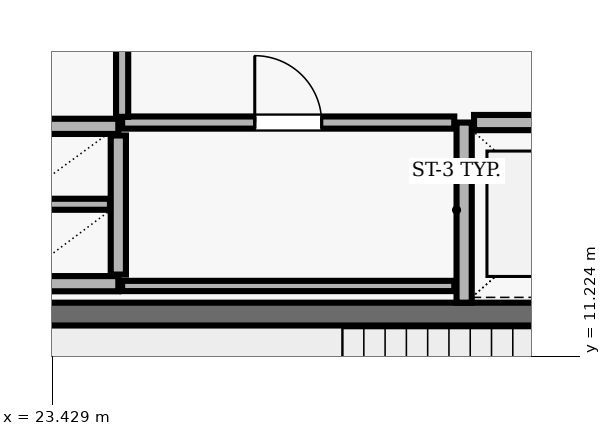
"""IFC4 building model, lengths in metres.
Left out: names, types, materials, properties, quantities, classifications, styles, units other than length and angle.
Written with IfcOpenShell. Run it as: python <this file> out.ifc"""

import sys

from ifc_helpers import new_model, si_unit, direction, frame, frame_2d, origin, place, context, subcontext, project, spatial, rectangle, extrude, element, fill, save


model = new_model("IFC4")
c1 = context("Model", 3, precision=1e-05, world=origin(), true_north=direction((0.0, 1.0)))
c2 = subcontext(c1, "Body", "Model", "MODEL_VIEW")
j1 = project(units=[si_unit("LENGTHUNIT", "METRE"), si_unit("PLANEANGLEUNIT", "RADIAN")], contexts=[c1])
p1 = place(None, origin())
s1 = spatial("IfcSite", under=j1, at=p1, CompositionType="ELEMENT")
p2 = place(p1, origin())
s2 = spatial("IfcBuilding", under=s1, at=p2, CompositionType="ELEMENT")
p3 = place(p2, frame((0.0, 0.0, 222.6)))
s3 = spatial("IfcBuildingStorey", under=s2, at=p3, CompositionType="ELEMENT", Elevation=222.6)
p4 = place(p3, frame((31.58, 11.78, 0.0), z_axis=(0.0, 0.0, 1.0), x_axis=(-1.0, 0.0, 0.0)))
e1 = element("IfcWall", 1, at=p4, inside=s3, PredefinedType="SHEAR", context=c2, shape_type="SweptSolid", body=[
    extrude(rectangle(XDim=8.36, YDim=0.3, at=frame_2d((4.18, 0.0))), origin(), (0.0, 0.0, 1.0), 3.69),
])
p5 = place(p3, frame((28.85, 14.3, 0.0), z_axis=(0.0, 0.0, 1.0), x_axis=(0.0, -1.0, 0.0)))
e2 = element("IfcWall", 2, at=p5, inside=s3, PredefinedType="SOLIDWALL", context=c2, shape_type="SweptSolid", body=[
    extrude(rectangle(XDim=2.37, YDim=0.2, at=frame_2d((1.185, 0.0))), origin(), (0.0, 0.0, 1.0), 3.69),
])
p6 = place(p3, frame((31.42, 14.3, 0.0), z_axis=(0.0, 0.0, 1.0), x_axis=(-1.0, 0.0, 0.0)))
e3 = element("IfcWall", 3, at=p6, inside=s3, PredefinedType="SOLIDWALL", context=c2, shape_type="SweptSolid", body=[
    extrude(rectangle(XDim=2.44, YDim=0.2, at=frame_2d((1.22, 0.0))), origin(), (0.0, 0.0, 1.0), 3.69),
])
for number, where, z_axis, x_axis in (
    (4, (22.9, 14.25, 0.0), (0.0, 0.0, 1.0), (1.0, 0.0, 0.0)),
    (5, (22.9, 12.18, 0.0), (0.0, 0.0, 1.0), (1.0, 0.0, 0.0)),
):
    element("IfcWall", number, at=place(p3, frame(where, z_axis=z_axis, x_axis=x_axis)), inside=s3, PredefinedType="SOLIDWALL", context=c2, shape_type="SweptSolid", body=[
        extrude(rectangle(XDim=1.4, YDim=0.2, at=frame_2d((0.7, 0.0))), origin(), (0.0, 0.0, 1.0), 3.69),
    ])
p7 = place(p3, frame((24.3, 12.3, 0.0), z_axis=(0.0, 0.0, 1.0), x_axis=(0.0, 1.0, 0.0)))
e6 = element("IfcWall", 6, at=p7, inside=s3, PredefinedType="SOLIDWALL", context=c2, shape_type="SweptSolid", body=[
    extrude(rectangle(XDim=1.83, YDim=0.2, at=frame_2d((0.915, 0.0))), origin(), (0.0, 0.0, 1.0), 3.69),
])
p8 = place(p3, frame((23.01, 13.225, 0.0), z_axis=(0.0, 0.0, 1.0), x_axis=(1.0, 0.0, 0.0)))
e7 = element("IfcWall", 7, at=p8, inside=s3, PredefinedType="PARTITIONING", context=c2, shape_type="SweptSolid", body=[
    extrude(rectangle(XDim=1.18, YDim=0.145, at=frame_2d((0.59, 0.0))), origin(), (0.0, 0.0, 1.0), 3.69),
])
p9 = place(p3, frame((24.35, 12.15, 0.0), z_axis=(0.0, 0.0, 1.0), x_axis=(1.0, 0.0, 0.0)))
e8 = element("IfcWall", 8, at=p9, inside=s3, PredefinedType="PARTITIONING", context=c2, shape_type="SweptSolid", body=[
    extrude(rectangle(XDim=4.37, YDim=0.135, at=frame_2d((2.185, 0.0))), origin(), (0.0, 0.0, 1.0), 3.69),
])
p10 = place(p3, frame((24.35, 14.3, 0.0), z_axis=(0.0, 0.0, 1.0), x_axis=(1.0, 0.0, 0.0)))
e9 = element("IfcWall", 9, at=p10, inside=s3, PredefinedType="PARTITIONING", context=c2, shape_type="SweptSolid", body=[
    extrude(rectangle(XDim=4.37, YDim=0.16, at=frame_2d((2.185, 0.0))), origin(), (0.0, 0.0, 1.0), 3.69),
])
p11 = place(p10, frame((1.745, 0.0, 0.0)))
e10 = element("IfcOpeningElement", 10, at=p11, cuts=e9, PredefinedType="OPENING", context=c2, shape_type="SweptSolid", body=[
    extrude(rectangle(XDim=0.88, YDim=2.1, at=frame_2d((0.44, 1.05))), frame((0.0, 0.09, 0.0), z_axis=(0.0, -1.0, 0.0), x_axis=(1.0, 0.0, 0.0)), (0.0, 0.0, 1.0), 0.18),
])
p12 = place(p3, frame((24.35, 15.29, 0.0), z_axis=(0.0, 0.0, 1.0), x_axis=(0.0, -1.0, 0.0)))
e11 = element("IfcWall", 11, at=p12, inside=s3, PredefinedType="PARTITIONING", context=c2, shape_type="SweptSolid", body=[
    extrude(rectangle(XDim=0.915, YDim=0.16, at=frame_2d((0.458, 0.0))), origin(), (0.0, 0.0, 1.0), 3.69),
])
p13 = place(p11, origin())
e12 = element("IfcDoor", 12, at=p13, inside=s3, OperationType="SINGLE_SWING_LEFT", PredefinedType="DOOR", context=c2, shape_type="SweptSolid", body=[
    extrude(rectangle(XDim=0.88, YDim=2.1, at=frame_2d((0.44, 1.05))), frame((0.0, 0.025, 0.0), z_axis=(0.0, -1.0, 0.0), x_axis=(1.0, 0.0, 0.0)), (0.0, 0.0, 1.0), 0.05),
])
fill(e10, e12)
save(model, sys.argv[1])
